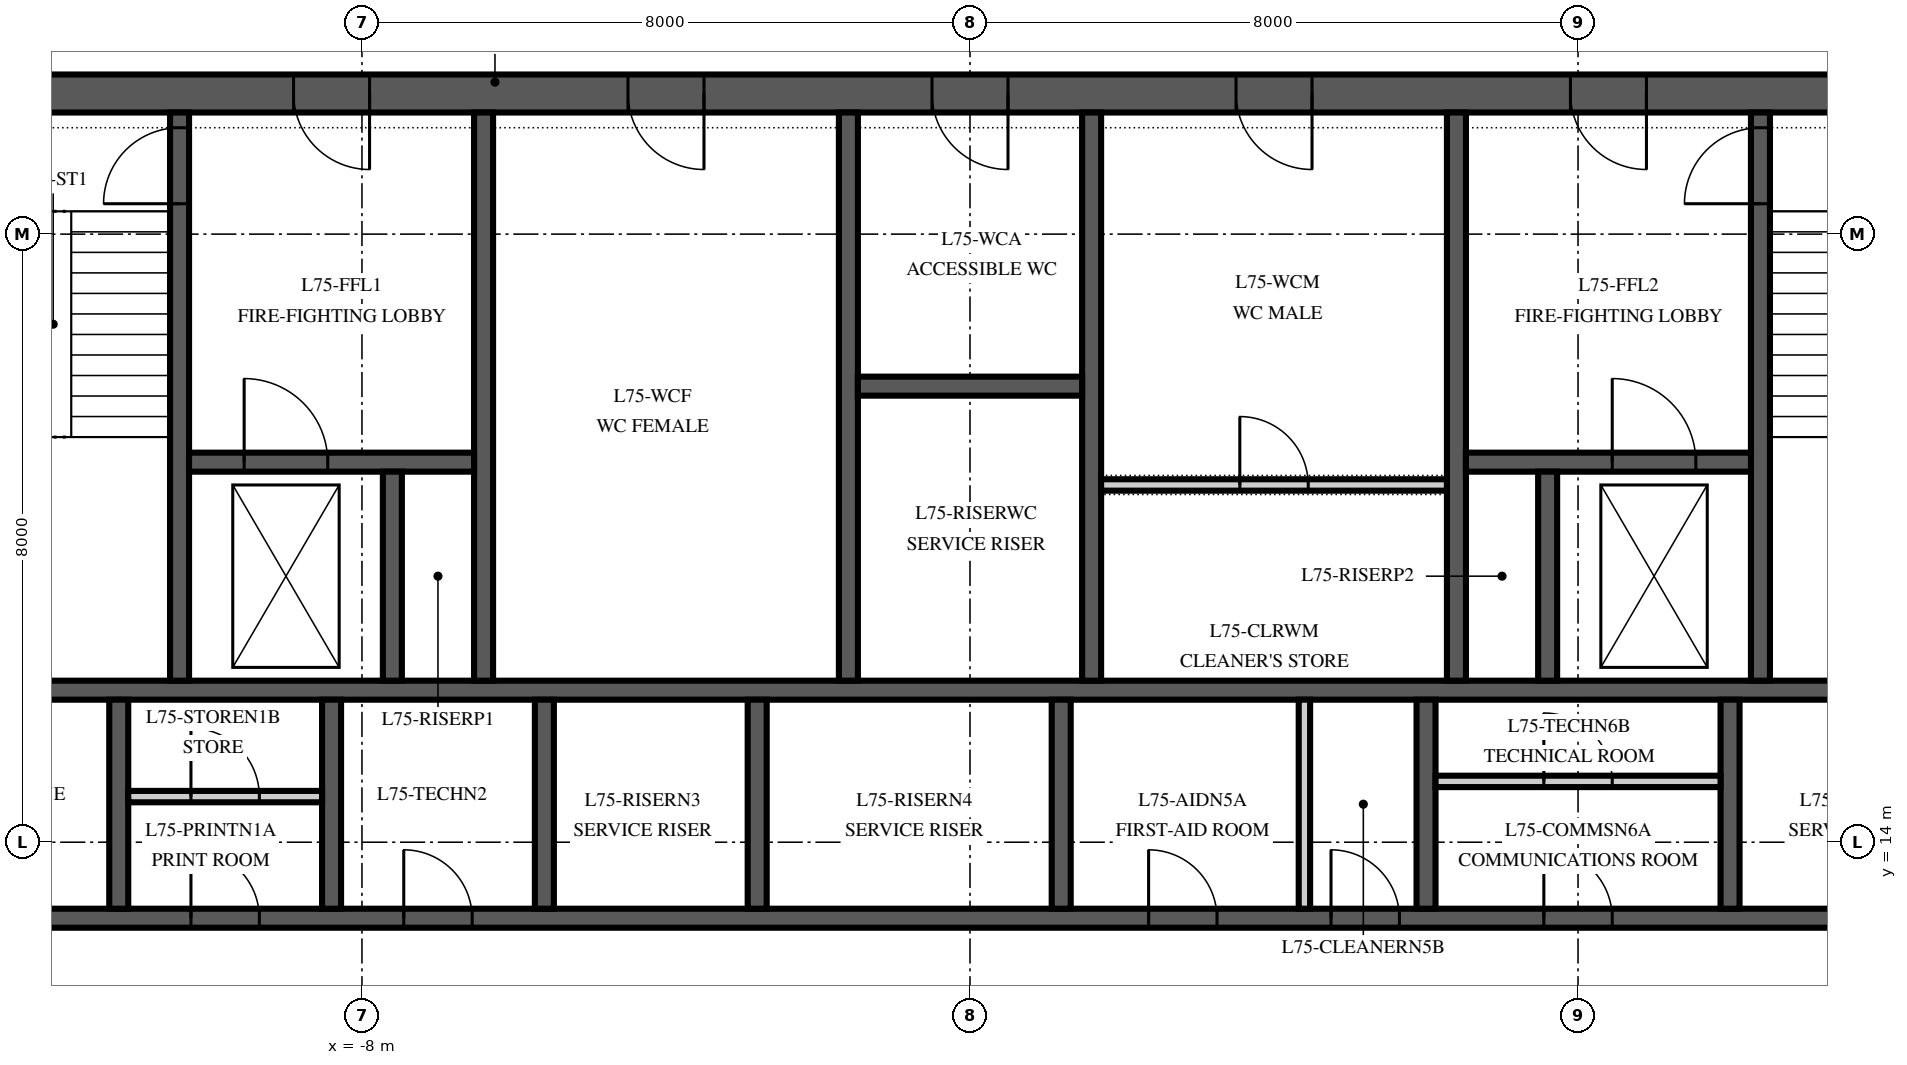
"""IFC4 building model, lengths in metres.
Left out: names, types, materials, properties, quantities, classifications, styles, units other than length and angle.
Written with IfcOpenShell. Run it as: python <this file> out.ifc"""

import sys

from ifc_helpers import new_model, si_unit, direction, frame, frame_2d, origin, place, context, subcontext, project, spatial, rectangle, extrude, element, fill, save


model = new_model("IFC4")
c1 = context("Model", 3, precision=1e-05, world=origin(), true_north=direction((0.0, 1.0)))
c2 = subcontext(c1, "Body", "Model", "MODEL_VIEW")
j1 = project(units=[si_unit("LENGTHUNIT", "METRE"), si_unit("PLANEANGLEUNIT", "RADIAN")], contexts=[c1])
p1 = place(None, origin())
s1 = spatial("IfcSite", under=j1, at=p1, CompositionType="ELEMENT")
p2 = place(p1, origin())
s2 = spatial("IfcBuilding", under=s1, at=p2, CompositionType="ELEMENT")
p3 = place(p2, frame((0.0, 0.0, 320.0)))
s3 = spatial("IfcBuildingStorey", under=s2, at=p3, CompositionType="ELEMENT", Elevation=320.0)
p4 = place(p3, frame((13.85, 23.85, 0.0), z_axis=(0.0, 0.0, 1.0), x_axis=(-1.0, 0.0, 0.0)))
e1 = element("IfcWall", 1, at=p4, inside=s3, PredefinedType="SHEAR", context=c2, shape_type="SweptSolid", body=[
    extrude(rectangle(XDim=27.7, YDim=0.5, at=frame_2d((13.85, 0.0))), origin(), (0.0, 0.0, 1.0), 4.0),
])
p5 = place(p4, frame((21.75, 0.0, 0.0)))
e2 = element("IfcOpeningElement", 2, at=p5, cuts=e1, PredefinedType="OPENING", context=c2, shape_type="SweptSolid", body=[
    extrude(rectangle(XDim=1.0, YDim=2.1, at=frame_2d((0.5, 1.05))), frame((0.0, 0.265, 0.0), z_axis=(0.0, -1.0, 0.0), x_axis=(1.0, 0.0, 0.0)), (0.0, 0.0, 1.0), 0.53),
])
p6 = place(p4, frame((4.95, 0.0, 0.0)))
e3 = element("IfcOpeningElement", 3, at=p6, cuts=e1, PredefinedType="OPENING", context=c2, shape_type="SweptSolid", body=[
    extrude(rectangle(XDim=1.0, YDim=2.1, at=frame_2d((0.5, 1.05))), frame((0.0, 0.265, 0.0), z_axis=(0.0, -1.0, 0.0), x_axis=(1.0, 0.0, 0.0)), (0.0, 0.0, 1.0), 0.53),
])
p7 = place(p4, frame((17.35, 0.0, 0.0)))
e4 = element("IfcOpeningElement", 4, at=p7, cuts=e1, PredefinedType="OPENING", context=c2, shape_type="SweptSolid", body=[
    extrude(rectangle(XDim=1.0, YDim=2.1, at=frame_2d((0.5, 1.05))), frame((0.0, 0.265, 0.0), z_axis=(0.0, -1.0, 0.0), x_axis=(1.0, 0.0, 0.0)), (0.0, 0.0, 1.0), 0.53),
])
p8 = place(p4, frame((13.35, 0.0, 0.0)))
e5 = element("IfcOpeningElement", 5, at=p8, cuts=e1, PredefinedType="OPENING", context=c2, shape_type="SweptSolid", body=[
    extrude(rectangle(XDim=1.0, YDim=2.1, at=frame_2d((0.5, 1.05))), frame((0.0, 0.265, 0.0), z_axis=(0.0, -1.0, 0.0), x_axis=(1.0, 0.0, 0.0)), (0.0, 0.0, 1.0), 0.53),
])
p9 = place(p4, frame((9.35, 0.0, 0.0)))
e6 = element("IfcOpeningElement", 6, at=p9, cuts=e1, PredefinedType="OPENING", context=c2, shape_type="SweptSolid", body=[
    extrude(rectangle(XDim=1.0, YDim=2.1, at=frame_2d((0.5, 1.05))), frame((0.0, 0.265, 0.0), z_axis=(0.0, -1.0, 0.0), x_axis=(1.0, 0.0, 0.0)), (0.0, 0.0, 1.0), 0.53),
])
p10 = place(p3, frame((-13.6, 13.0, 0.0), z_axis=(0.0, 0.0, 1.0), x_axis=(1.0, 0.0, 0.0)))
e7 = element("IfcWall", 7, at=p10, inside=s3, PredefinedType="SHEAR", context=c2, shape_type="SweptSolid", body=[
    extrude(rectangle(XDim=27.2, YDim=0.25, at=frame_2d((13.6, 0.0))), origin(), (0.0, 0.0, 1.0), 4.0),
])
p11 = place(p10, frame((15.95, 0.0, 0.0)))
e8 = element("IfcOpeningElement", 8, at=p11, cuts=e7, PredefinedType="OPENING", context=c2, shape_type="SweptSolid", body=[
    extrude(rectangle(XDim=0.9, YDim=2.1, at=frame_2d((0.45, 1.05))), frame((0.0, 0.14, 0.0), z_axis=(0.0, -1.0, 0.0), x_axis=(1.0, 0.0, 0.0)), (0.0, 0.0, 1.0), 0.28),
])
p12 = place(p10, frame((18.35, 0.0, 0.0)))
e9 = element("IfcOpeningElement", 9, at=p12, cuts=e7, PredefinedType="OPENING", context=c2, shape_type="SweptSolid", body=[
    extrude(rectangle(XDim=0.9, YDim=2.1, at=frame_2d((0.45, 1.05))), frame((0.0, 0.14, 0.0), z_axis=(0.0, -1.0, 0.0), x_axis=(1.0, 0.0, 0.0)), (0.0, 0.0, 1.0), 0.28),
])
p13 = place(p10, frame((21.15, 0.0, 0.0)))
e10 = element("IfcOpeningElement", 10, at=p13, cuts=e7, PredefinedType="OPENING", context=c2, shape_type="SweptSolid", body=[
    extrude(rectangle(XDim=0.9, YDim=2.1, at=frame_2d((0.45, 1.05))), frame((0.0, 0.14, 0.0), z_axis=(0.0, -1.0, 0.0), x_axis=(1.0, 0.0, 0.0)), (0.0, 0.0, 1.0), 0.28),
])
p14 = place(p10, frame((0.55, 0.0, 0.0)))
e11 = element("IfcOpeningElement", 11, at=p14, cuts=e7, PredefinedType="OPENING", context=c2, shape_type="SweptSolid", body=[
    extrude(rectangle(XDim=0.9, YDim=2.1, at=frame_2d((0.45, 1.05))), frame((0.0, 0.14, 0.0), z_axis=(0.0, -1.0, 0.0), x_axis=(1.0, 0.0, 0.0)), (0.0, 0.0, 1.0), 0.28),
])
p15 = place(p10, frame((3.35, 0.0, 0.0)))
e12 = element("IfcOpeningElement", 12, at=p15, cuts=e7, PredefinedType="OPENING", context=c2, shape_type="SweptSolid", body=[
    extrude(rectangle(XDim=0.9, YDim=2.1, at=frame_2d((0.45, 1.05))), frame((0.0, 0.14, 0.0), z_axis=(0.0, -1.0, 0.0), x_axis=(1.0, 0.0, 0.0)), (0.0, 0.0, 1.0), 0.28),
])
p16 = place(p10, frame((6.15, 0.0, 0.0)))
e13 = element("IfcOpeningElement", 13, at=p16, cuts=e7, PredefinedType="OPENING", context=c2, shape_type="SweptSolid", body=[
    extrude(rectangle(XDim=0.9, YDim=2.1, at=frame_2d((0.45, 1.05))), frame((0.0, 0.14, 0.0), z_axis=(0.0, -1.0, 0.0), x_axis=(1.0, 0.0, 0.0)), (0.0, 0.0, 1.0), 0.28),
])
p17 = place(p3, frame((-13.6, 16.0, 0.0), z_axis=(0.0, 0.0, 1.0), x_axis=(1.0, 0.0, 0.0)))
e14 = element("IfcWall", 14, at=p17, inside=s3, PredefinedType="SHEAR", context=c2, shape_type="SweptSolid", body=[
    extrude(rectangle(XDim=27.2, YDim=0.25, at=frame_2d((13.6, 0.0))), origin(), (0.0, 0.0, 1.0), 4.0),
])
for number, where, z_axis, x_axis in (
    (15, (-11.2, 13.125, 0.0), (0.0, 0.0, 1.0), (0.0, 1.0, 0.0)),
    (16, (-8.4, 13.125, 0.0), (0.0, 0.0, 1.0), (0.0, 1.0, 0.0)),
    (17, (-5.6, 13.125, 0.0), (0.0, 0.0, 1.0), (0.0, 1.0, 0.0)),
    (18, (-2.8, 13.125, 0.0), (0.0, 0.0, 1.0), (0.0, 1.0, 0.0)),
    (19, (1.2, 13.125, 0.0), (0.0, 0.0, 1.0), (0.0, 1.0, 0.0)),
    (20, (6.0, 13.125, 0.0), (0.0, 0.0, 1.0), (0.0, 1.0, 0.0)),
    (21, (10.0, 13.125, 0.0), (0.0, 0.0, 1.0), (0.0, 1.0, 0.0)),
):
    element("IfcWall", number, at=place(p3, frame(where, z_axis=z_axis, x_axis=x_axis)), inside=s3, PredefinedType="SHEAR", context=c2, shape_type="SweptSolid", body=[
        extrude(rectangle(XDim=2.75, YDim=0.25, at=frame_2d((1.375, 0.0))), origin(), (0.0, 0.0, 1.0), 4.0),
    ])
p18 = place(p3, frame((-10.4, 16.125, 0.0), z_axis=(0.0, 0.0, 1.0), x_axis=(0.0, 1.0, 0.0)))
e22 = element("IfcWall", 22, at=p18, inside=s3, PredefinedType="SHEAR", context=c2, shape_type="SweptSolid", body=[
    extrude(rectangle(XDim=7.475, YDim=0.25, at=frame_2d((3.738, 0.0))), origin(), (0.0, 0.0, 1.0), 4.0),
])
p19 = place(p18, frame((6.275, 0.0, 0.0)))
e23 = element("IfcOpeningElement", 23, at=p19, cuts=e22, PredefinedType="OPENING", context=c2, shape_type="SweptSolid", body=[
    extrude(rectangle(XDim=1.0, YDim=2.1, at=frame_2d((0.5, 1.05))), frame((0.0, 0.14, 0.0), z_axis=(0.0, -1.0, 0.0), x_axis=(1.0, 0.0, 0.0)), (0.0, 0.0, 1.0), 0.28),
])
for number, where, z_axis, x_axis in (
    (24, (-6.4, 16.125, 0.0), (0.0, 0.0, 1.0), (0.0, 1.0, 0.0)),
    (25, (-1.6, 16.125, 0.0), (0.0, 0.0, 1.0), (0.0, 1.0, 0.0)),
    (26, (1.6, 16.125, 0.0), (0.0, 0.0, 1.0), (0.0, 1.0, 0.0)),
    (27, (6.4, 16.125, 0.0), (0.0, 0.0, 1.0), (0.0, 1.0, 0.0)),
):
    element("IfcWall", number, at=place(p3, frame(where, z_axis=z_axis, x_axis=x_axis)), inside=s3, PredefinedType="SHEAR", context=c2, shape_type="SweptSolid", body=[
        extrude(rectangle(XDim=7.475, YDim=0.25, at=frame_2d((3.738, 0.0))), origin(), (0.0, 0.0, 1.0), 4.0),
    ])
p20 = place(p3, frame((10.4, 16.125, 0.0), z_axis=(0.0, 0.0, 1.0), x_axis=(0.0, 1.0, 0.0)))
e28 = element("IfcWall", 28, at=p20, inside=s3, PredefinedType="SHEAR", context=c2, shape_type="SweptSolid", body=[
    extrude(rectangle(XDim=7.475, YDim=0.25, at=frame_2d((3.738, 0.0))), origin(), (0.0, 0.0, 1.0), 4.0),
])
p21 = place(p20, frame((6.275, 0.0, 0.0)))
e29 = element("IfcOpeningElement", 29, at=p21, cuts=e28, PredefinedType="OPENING", context=c2, shape_type="SweptSolid", body=[
    extrude(rectangle(XDim=1.0, YDim=2.1, at=frame_2d((0.5, 1.05))), frame((0.0, 0.14, 0.0), z_axis=(0.0, -1.0, 0.0), x_axis=(1.0, 0.0, 0.0)), (0.0, 0.0, 1.0), 0.28),
])
p22 = place(p3, frame((-10.275, 19.0, 0.0), z_axis=(0.0, 0.0, 1.0), x_axis=(1.0, 0.0, 0.0)))
e30 = element("IfcWall", 30, at=p22, inside=s3, PredefinedType="SHEAR", context=c2, shape_type="SweptSolid", body=[
    extrude(rectangle(XDim=3.75, YDim=0.25, at=frame_2d((1.875, 0.0))), origin(), (0.0, 0.0, 1.0), 4.0),
])
p23 = place(p22, frame((0.725, 0.0, 0.0)))
e31 = element("IfcOpeningElement", 31, at=p23, cuts=e30, PredefinedType="OPENING", context=c2, shape_type="SweptSolid", body=[
    extrude(rectangle(XDim=1.1, YDim=2.1, at=frame_2d((0.55, 1.05))), frame((0.0, 0.14, 0.0), z_axis=(0.0, -1.0, 0.0), x_axis=(1.0, 0.0, 0.0)), (0.0, 0.0, 1.0), 0.28),
])
p24 = place(p3, frame((6.525, 19.0, 0.0), z_axis=(0.0, 0.0, 1.0), x_axis=(1.0, 0.0, 0.0)))
e32 = element("IfcWall", 32, at=p24, inside=s3, PredefinedType="SHEAR", context=c2, shape_type="SweptSolid", body=[
    extrude(rectangle(XDim=3.75, YDim=0.25, at=frame_2d((1.875, 0.0))), origin(), (0.0, 0.0, 1.0), 4.0),
])
p25 = place(p24, frame((1.925, 0.0, 0.0)))
e33 = element("IfcOpeningElement", 33, at=p25, cuts=e32, PredefinedType="OPENING", context=c2, shape_type="SweptSolid", body=[
    extrude(rectangle(XDim=1.1, YDim=2.1, at=frame_2d((0.55, 1.05))), frame((0.0, 0.14, 0.0), z_axis=(0.0, -1.0, 0.0), x_axis=(1.0, 0.0, 0.0)), (0.0, 0.0, 1.0), 0.28),
])
for number, where, z_axis, x_axis in (
    (34, (-7.6, 16.125, 0.0), (0.0, 0.0, 1.0), (0.0, 1.0, 0.0)),
    (35, (7.6, 16.125, 0.0), (0.0, 0.0, 1.0), (0.0, 1.0, 0.0)),
):
    element("IfcWall", number, at=place(p3, frame(where, z_axis=z_axis, x_axis=x_axis)), inside=s3, PredefinedType="SHEAR", context=c2, shape_type="SweptSolid", body=[
        extrude(rectangle(XDim=2.75, YDim=0.25, at=frame_2d((1.375, 0.0))), origin(), (0.0, 0.0, 1.0), 4.0),
    ])
p26 = place(p3, frame((-1.475, 20.0, 0.0), z_axis=(0.0, 0.0, 1.0), x_axis=(1.0, 0.0, 0.0)))
e36 = element("IfcWall", 36, at=p26, inside=s3, PredefinedType="SHEAR", context=c2, shape_type="SweptSolid", body=[
    extrude(rectangle(XDim=2.95, YDim=0.25, at=frame_2d((1.475, 0.0))), origin(), (0.0, 0.0, 1.0), 4.0),
])
p27 = place(p3, frame((1.725, 18.7, 0.0), z_axis=(0.0, 0.0, 1.0), x_axis=(1.0, 0.0, 0.0)))
e37 = element("IfcWall", 37, at=p27, inside=s3, PredefinedType="PARTITIONING", context=c2, shape_type="SweptSolid", body=[
    extrude(rectangle(XDim=4.55, YDim=0.15, at=frame_2d((2.275, 0.0))), origin(), (0.0, 0.0, 1.0), 3.85),
])
p28 = place(p27, frame((1.825, 0.0, 0.0)))
e38 = element("IfcOpeningElement", 38, at=p28, cuts=e37, PredefinedType="OPENING", context=c2, shape_type="SweptSolid", body=[
    extrude(rectangle(XDim=0.9, YDim=2.1, at=frame_2d((0.45, 1.05))), frame((0.0, 0.09, 0.0), z_axis=(0.0, -1.0, 0.0), x_axis=(1.0, 0.0, 0.0)), (0.0, 0.0, 1.0), 0.18),
])
p29 = place(p3, frame((4.4, 13.125, 0.0), z_axis=(0.0, 0.0, 1.0), x_axis=(0.0, 1.0, 0.0)))
e39 = element("IfcWall", 39, at=p29, inside=s3, PredefinedType="PARTITIONING", context=c2, shape_type="SweptSolid", body=[
    extrude(rectangle(XDim=2.75, YDim=0.15, at=frame_2d((1.375, 0.0))), origin(), (0.0, 0.0, 1.0), 3.85),
])
p30 = place(p3, frame((6.125, 14.8, 0.0), z_axis=(0.0, 0.0, 1.0), x_axis=(1.0, 0.0, 0.0)))
e40 = element("IfcWall", 40, at=p30, inside=s3, PredefinedType="PARTITIONING", context=c2, shape_type="SweptSolid", body=[
    extrude(rectangle(XDim=3.75, YDim=0.15, at=frame_2d((1.875, 0.0))), origin(), (0.0, 0.0, 1.0), 3.85),
])
p31 = place(p30, frame((1.425, 0.0, 0.0)))
e41 = element("IfcOpeningElement", 41, at=p31, cuts=e40, PredefinedType="OPENING", context=c2, shape_type="SweptSolid", body=[
    extrude(rectangle(XDim=0.9, YDim=2.1, at=frame_2d((0.45, 1.05))), frame((0.0, 0.09, 0.0), z_axis=(0.0, -1.0, 0.0), x_axis=(1.0, 0.0, 0.0)), (0.0, 0.0, 1.0), 0.18),
])
p32 = place(p3, frame((-11.075, 14.6, 0.0), z_axis=(0.0, 0.0, 1.0), x_axis=(1.0, 0.0, 0.0)))
e42 = element("IfcWall", 42, at=p32, inside=s3, PredefinedType="PARTITIONING", context=c2, shape_type="SweptSolid", body=[
    extrude(rectangle(XDim=2.55, YDim=0.15, at=frame_2d((1.275, 0.0))), origin(), (0.0, 0.0, 1.0), 3.85),
])
p33 = place(p32, frame((0.825, 0.0, 0.0)))
e43 = element("IfcOpeningElement", 43, at=p33, cuts=e42, PredefinedType="OPENING", context=c2, shape_type="SweptSolid", body=[
    extrude(rectangle(XDim=0.9, YDim=2.1, at=frame_2d((0.45, 1.05))), frame((0.0, 0.09, 0.0), z_axis=(0.0, -1.0, 0.0), x_axis=(1.0, 0.0, 0.0)), (0.0, 0.0, 1.0), 0.18),
])
p34 = place(p5, origin())
e44 = element("IfcDoor", 44, at=p34, inside=s3, OperationType="SINGLE_SWING_RIGHT", PredefinedType="DOOR", context=c2, shape_type="SweptSolid", body=[
    extrude(rectangle(XDim=1.0, YDim=2.1, at=frame_2d((0.5, 1.05))), frame((0.0, 0.25, 0.0), z_axis=(0.0, -1.0, 0.0), x_axis=(1.0, 0.0, 0.0)), (0.0, 0.0, 1.0), 0.5),
])
fill(e2, e44)
p35 = place(p6, origin())
e45 = element("IfcDoor", 45, at=p35, inside=s3, OperationType="SINGLE_SWING_RIGHT", PredefinedType="DOOR", context=c2, shape_type="SweptSolid", body=[
    extrude(rectangle(XDim=1.0, YDim=2.1, at=frame_2d((0.5, 1.05))), frame((0.0, 0.25, 0.0), z_axis=(0.0, -1.0, 0.0), x_axis=(1.0, 0.0, 0.0)), (0.0, 0.0, 1.0), 0.5),
])
fill(e3, e45)
p36 = place(p7, origin())
e46 = element("IfcDoor", 46, at=p36, inside=s3, OperationType="SINGLE_SWING_LEFT", PredefinedType="DOOR", context=c2, shape_type="SweptSolid", body=[
    extrude(rectangle(XDim=1.0, YDim=2.1, at=frame_2d((0.5, 1.05))), frame((0.0, 0.25, 0.0), z_axis=(0.0, -1.0, 0.0), x_axis=(1.0, 0.0, 0.0)), (0.0, 0.0, 1.0), 0.5),
])
fill(e4, e46)
p37 = place(p8, origin())
e47 = element("IfcDoor", 47, at=p37, inside=s3, OperationType="SINGLE_SWING_LEFT", PredefinedType="DOOR", context=c2, shape_type="SweptSolid", body=[
    extrude(rectangle(XDim=1.0, YDim=2.1, at=frame_2d((0.5, 1.05))), frame((0.0, 0.25, 0.0), z_axis=(0.0, -1.0, 0.0), x_axis=(1.0, 0.0, 0.0)), (0.0, 0.0, 1.0), 0.5),
])
fill(e5, e47)
p38 = place(p9, origin())
e48 = element("IfcDoor", 48, at=p38, inside=s3, OperationType="SINGLE_SWING_LEFT", PredefinedType="DOOR", context=c2, shape_type="SweptSolid", body=[
    extrude(rectangle(XDim=1.0, YDim=2.1, at=frame_2d((0.5, 1.05))), frame((0.0, 0.25, 0.0), z_axis=(0.0, -1.0, 0.0), x_axis=(1.0, 0.0, 0.0)), (0.0, 0.0, 1.0), 0.5),
])
fill(e6, e48)
p39 = place(p19, origin())
e49 = element("IfcDoor", 49, at=p39, inside=s3, OperationType="SINGLE_SWING_LEFT", PredefinedType="DOOR", context=c2, shape_type="SweptSolid", body=[
    extrude(rectangle(XDim=1.0, YDim=2.1, at=frame_2d((0.5, 1.05))), frame((0.0, 0.125, 0.0), z_axis=(0.0, -1.0, 0.0), x_axis=(1.0, 0.0, 0.0)), (0.0, 0.0, 1.0), 0.25),
])
fill(e23, e49)
p40 = place(p21, origin())
e50 = element("IfcDoor", 50, at=p40, inside=s3, OperationType="SINGLE_SWING_LEFT", PredefinedType="DOOR", context=c2, shape_type="SweptSolid", body=[
    extrude(rectangle(XDim=1.0, YDim=2.1, at=frame_2d((0.5, 1.05))), frame((0.0, 0.125, 0.0), z_axis=(0.0, -1.0, 0.0), x_axis=(1.0, 0.0, 0.0)), (0.0, 0.0, 1.0), 0.25),
])
fill(e29, e50)
p41 = place(p25, origin())
e51 = element("IfcDoor", 51, at=p41, inside=s3, OperationType="SLIDING_TO_RIGHT", PredefinedType="DOOR", context=c2, shape_type="SweptSolid", body=[
    extrude(rectangle(XDim=1.1, YDim=2.1, at=frame_2d((0.55, 1.05))), frame((0.0, 0.125, 0.0), z_axis=(0.0, -1.0, 0.0), x_axis=(1.0, 0.0, 0.0)), (0.0, 0.0, 1.0), 0.25),
])
fill(e33, e51)
p42 = place(p23, origin())
e52 = element("IfcDoor", 52, at=p42, inside=s3, OperationType="SLIDING_TO_RIGHT", PredefinedType="DOOR", context=c2, shape_type="SweptSolid", body=[
    extrude(rectangle(XDim=1.1, YDim=2.1, at=frame_2d((0.55, 1.05))), frame((0.0, 0.125, 0.0), z_axis=(0.0, -1.0, 0.0), x_axis=(1.0, 0.0, 0.0)), (0.0, 0.0, 1.0), 0.25),
])
fill(e31, e52)
p43 = place(p11, origin())
e53 = element("IfcDoor", 53, at=p43, inside=s3, OperationType="SINGLE_SWING_LEFT", PredefinedType="DOOR", context=c2, shape_type="SweptSolid", body=[
    extrude(rectangle(XDim=0.9, YDim=2.1, at=frame_2d((0.45, 1.05))), frame((0.0, 0.125, 0.0), z_axis=(0.0, -1.0, 0.0), x_axis=(1.0, 0.0, 0.0)), (0.0, 0.0, 1.0), 0.25),
])
fill(e8, e53)
p44 = place(p12, origin())
e54 = element("IfcDoor", 54, at=p44, inside=s3, OperationType="SINGLE_SWING_LEFT", PredefinedType="DOOR", context=c2, shape_type="SweptSolid", body=[
    extrude(rectangle(XDim=0.9, YDim=2.1, at=frame_2d((0.45, 1.05))), frame((0.0, 0.125, 0.0), z_axis=(0.0, -1.0, 0.0), x_axis=(1.0, 0.0, 0.0)), (0.0, 0.0, 1.0), 0.25),
])
fill(e9, e54)
p45 = place(p13, origin())
e55 = element("IfcDoor", 55, at=p45, inside=s3, OperationType="SINGLE_SWING_LEFT", PredefinedType="DOOR", context=c2, shape_type="SweptSolid", body=[
    extrude(rectangle(XDim=0.9, YDim=2.1, at=frame_2d((0.45, 1.05))), frame((0.0, 0.125, 0.0), z_axis=(0.0, -1.0, 0.0), x_axis=(1.0, 0.0, 0.0)), (0.0, 0.0, 1.0), 0.25),
])
fill(e10, e55)
p46 = place(p31, origin())
e56 = element("IfcDoor", 56, at=p46, inside=s3, OperationType="SINGLE_SWING_LEFT", PredefinedType="DOOR", context=c2, shape_type="SweptSolid", body=[
    extrude(rectangle(XDim=0.9, YDim=2.1, at=frame_2d((0.45, 1.05))), frame((0.0, 0.075, 0.0), z_axis=(0.0, -1.0, 0.0), x_axis=(1.0, 0.0, 0.0)), (0.0, 0.0, 1.0), 0.149),
])
fill(e41, e56)
p47 = place(p15, origin())
e57 = element("IfcDoor", 57, at=p47, inside=s3, OperationType="SINGLE_SWING_LEFT", PredefinedType="DOOR", context=c2, shape_type="SweptSolid", body=[
    extrude(rectangle(XDim=0.9, YDim=2.1, at=frame_2d((0.45, 1.05))), frame((0.0, 0.125, 0.0), z_axis=(0.0, -1.0, 0.0), x_axis=(1.0, 0.0, 0.0)), (0.0, 0.0, 1.0), 0.25),
])
fill(e12, e57)
p48 = place(p33, origin())
e58 = element("IfcDoor", 58, at=p48, inside=s3, OperationType="SINGLE_SWING_LEFT", PredefinedType="DOOR", context=c2, shape_type="SweptSolid", body=[
    extrude(rectangle(XDim=0.9, YDim=2.1, at=frame_2d((0.45, 1.05))), frame((0.0, 0.075, 0.0), z_axis=(0.0, -1.0, 0.0), x_axis=(1.0, 0.0, 0.0)), (0.0, 0.0, 1.0), 0.149),
])
fill(e43, e58)
p49 = place(p16, origin())
e59 = element("IfcDoor", 59, at=p49, inside=s3, OperationType="SINGLE_SWING_LEFT", PredefinedType="DOOR", context=c2, shape_type="SweptSolid", body=[
    extrude(rectangle(XDim=0.9, YDim=2.1, at=frame_2d((0.45, 1.05))), frame((0.0, 0.125, 0.0), z_axis=(0.0, -1.0, 0.0), x_axis=(1.0, 0.0, 0.0)), (0.0, 0.0, 1.0), 0.25),
])
fill(e13, e59)
p50 = place(p28, origin())
e60 = element("IfcDoor", 60, at=p50, inside=s3, OperationType="SINGLE_SWING_LEFT", PredefinedType="DOOR", context=c2, shape_type="SweptSolid", body=[
    extrude(rectangle(XDim=0.9, YDim=2.1, at=frame_2d((0.45, 1.05))), frame((0.0, 0.075, 0.0), z_axis=(0.0, -1.0, 0.0), x_axis=(1.0, 0.0, 0.0)), (0.0, 0.0, 1.0), 0.149),
])
fill(e38, e60)
save(model, sys.argv[1])
